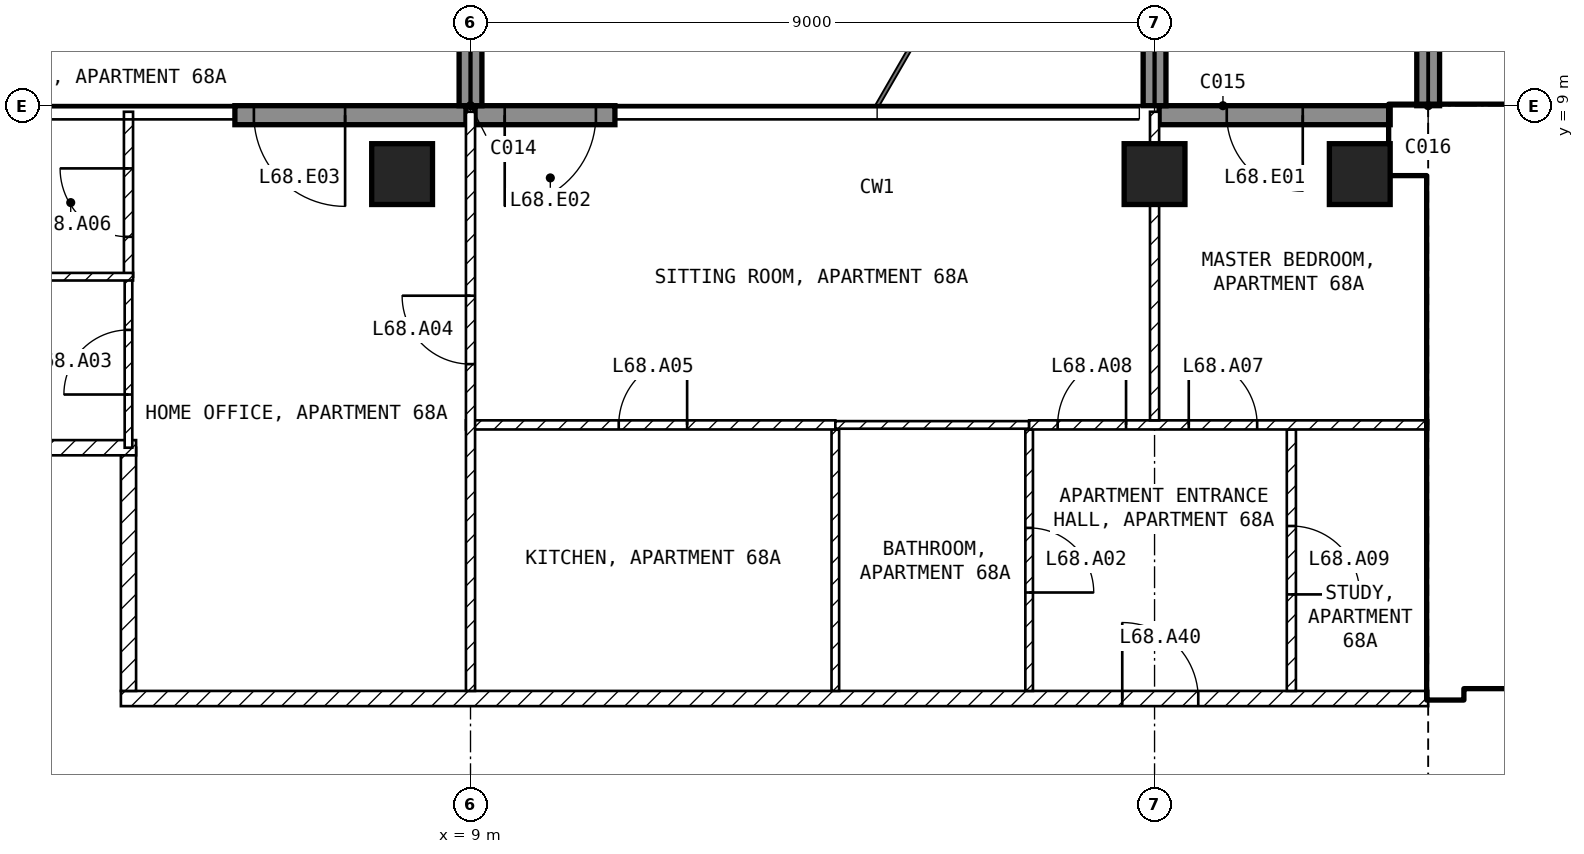
"""IFC4 building model, lengths in metres.
Left out: names, types, materials, properties, quantities, classifications, styles, units other than length and angle.
Written with IfcOpenShell. Run it as: python <this file> out.ifc"""

import sys

from ifc_helpers import new_model, si_unit, direction, frame, frame_2d, origin, origin_2d, place, context, subcontext, project, spatial, rectangle, extrude, element, fill, save


model = new_model("IFC4")
c1 = context("Model", 3, precision=1e-05, world=origin(), true_north=direction((0.0, 1.0)))
c2 = subcontext(c1, "Body", "Model", "MODEL_VIEW")
j1 = project(units=[si_unit("LENGTHUNIT", "METRE"), si_unit("PLANEANGLEUNIT", "RADIAN")], contexts=[c1])
p1 = place(None, origin())
s1 = spatial("IfcSite", under=j1, at=p1, CompositionType="ELEMENT")
p2 = place(p1, origin())
s2 = spatial("IfcBuilding", under=s1, at=p2, CompositionType="ELEMENT")
p3 = place(p2, frame((0.0, 0.0, 267.5)))
s3 = spatial("IfcBuildingStorey", under=s2, at=p3, CompositionType="ELEMENT", Elevation=267.5)
for number, where, z_axis, x_axis in (
    (1, (8.1, 8.1, -0.25), (0.0, 0.0, 1.0), (1.0, 0.0, 0.0)),
    (2, (18.0, 8.1, -0.25), (0.0, 0.0, 1.0), (1.0, 0.0, 0.0)),
    (3, (20.7, 8.1, -0.25), (0.0, 0.0, 1.0), (1.0, 0.0, 0.0)),
):
    element("IfcColumn", number, at=place(p3, frame(where, z_axis=z_axis, x_axis=x_axis)), inside=s3, PredefinedType="COLUMN", context=c2, shape_type="SweptSolid", body=[
        extrude(rectangle(XDim=0.8, YDim=0.8, at=origin_2d()), origin(), (0.0, 0.0, 1.0), 3.5),
    ])
p4 = place(p3, frame((21.1, 8.875, 0.0), z_axis=(0.0, 0.0, 1.0), x_axis=(-1.0, 0.0, 0.0)))
e4 = element("IfcWall", 4, at=p4, inside=s3, PredefinedType="SOLIDWALL", context=c2, shape_type="SweptSolid", body=[
    extrude(rectangle(XDim=3.04, YDim=0.25, at=frame_2d((1.52, 0.0))), origin(), (0.0, 0.0, 1.0), 3.25),
])
p5 = place(p4, frame((1.15, 0.0, 0.0)))
e5 = element("IfcOpeningElement", 5, at=p5, cuts=e4, PredefinedType="OPENING", context=c2, shape_type="SweptSolid", body=[
    extrude(rectangle(XDim=1.0, YDim=2.4, at=frame_2d((0.5, 1.2))), frame((0.0, 0.135, 0.0), z_axis=(0.0, -1.0, 0.0), x_axis=(1.0, 0.0, 0.0)), (0.0, 0.0, 1.0), 0.27),
])
p6 = place(p3, frame((10.9, 8.875, 0.0), z_axis=(0.0, 0.0, 1.0), x_axis=(-1.0, 0.0, 0.0)))
e6 = element("IfcWall", 6, at=p6, inside=s3, PredefinedType="SOLIDWALL", context=c2, shape_type="SweptSolid", body=[
    extrude(rectangle(XDim=1.84, YDim=0.25, at=frame_2d((0.92, 0.0))), origin(), (0.0, 0.0, 1.0), 3.25),
])
p7 = place(p6, frame((0.25, 0.0, 0.0)))
e7 = element("IfcOpeningElement", 7, at=p7, cuts=e6, PredefinedType="OPENING", context=c2, shape_type="SweptSolid", body=[
    extrude(rectangle(XDim=1.2, YDim=2.4, at=frame_2d((0.6, 1.2))), frame((0.0, 0.135, 0.0), z_axis=(0.0, -1.0, 0.0), x_axis=(1.0, 0.0, 0.0)), (0.0, 0.0, 1.0), 0.27),
])
p8 = place(p3, frame((8.94, 8.875, 0.0), z_axis=(0.0, 0.0, 1.0), x_axis=(-1.0, 0.0, 0.0)))
e8 = element("IfcWall", 8, at=p8, inside=s3, PredefinedType="SOLIDWALL", context=c2, shape_type="SweptSolid", body=[
    extrude(rectangle(XDim=3.04, YDim=0.25, at=frame_2d((1.52, 0.0))), origin(), (0.0, 0.0, 1.0), 3.25),
])
p9 = place(p8, frame((1.59, 0.0, 0.0)))
e9 = element("IfcOpeningElement", 9, at=p9, cuts=e8, PredefinedType="OPENING", context=c2, shape_type="SweptSolid", body=[
    extrude(rectangle(XDim=1.2, YDim=2.4, at=frame_2d((0.6, 1.2))), frame((0.0, 0.135, 0.0), z_axis=(0.0, -1.0, 0.0), x_axis=(1.0, 0.0, 0.0)), (0.0, 0.0, 1.0), 0.27),
])
for number, where, z_axis, x_axis in (
    (10, (9.0, 9.0, 0.0), (0.0, 0.0, 1.0), (0.0, 1.0, 0.0)),
    (11, (18.0, 9.0, 0.0), (0.0, 0.0, 1.0), (0.0, 1.0, 0.0)),
    (12, (21.6, 9.0, 0.0), (0.0, 0.0, 1.0), (0.0, 1.0, 0.0)),
):
    element("IfcWall", number, at=place(p3, frame(where, z_axis=z_axis, x_axis=x_axis)), inside=s3, PredefinedType="SOLIDWALL", context=c2, shape_type="SweptSolid", body=[
        extrude(rectangle(XDim=2.7, YDim=0.3, at=frame_2d((1.35, 0.0))), origin(), (0.0, 0.0, 1.0), 3.25),
    ])
p10 = place(p3, frame((21.1, 8.55, 0.0), z_axis=(0.0, 0.0, 1.0), x_axis=(1.0, 0.0, 0.0)))
e13 = element("IfcWall", 13, at=p10, inside=s3, PredefinedType="SHEAR", context=c2, shape_type="SweptSolid", body=[
    extrude(rectangle(XDim=8.65, YDim=0.9, at=frame_2d((4.325, 0.0))), origin(), (0.0, 0.0, 1.0), 3.25),
])
p11 = place(p3, frame((21.825, 1.2, 0.0), z_axis=(0.0, 0.0, 1.0), x_axis=(0.0, 1.0, 0.0)))
e14 = element("IfcWall", 14, at=p11, inside=s3, PredefinedType="SHEAR", context=c2, shape_type="SweptSolid", body=[
    extrude(rectangle(XDim=6.9, YDim=0.45, at=frame_2d((3.45, 0.0))), origin(), (0.0, 0.0, 1.0), 3.25),
])
p12 = place(p3, frame((22.05, 1.45, 0.0), z_axis=(0.0, 0.0, 1.0), x_axis=(1.0, 0.0, 0.0)))
e15 = element("IfcWall", 15, at=p12, inside=s3, PredefinedType="SOLIDWALL", context=c2, shape_type="SweptSolid", body=[
    extrude(rectangle(XDim=11.3, YDim=0.2, at=frame_2d((5.65, 0.0))), origin(), (0.0, 0.0, 1.0), 3.25),
])
p13 = place(p12, frame((0.75, 0.0, 0.0)))
e16 = element("IfcOpeningElement", 16, at=p13, cuts=e15, PredefinedType="OPENING", context=c2, shape_type="SweptSolid", body=[
    extrude(rectangle(XDim=1.0, YDim=2.1, at=frame_2d((0.5, 1.05))), frame((0.0, 0.11, 0.0), z_axis=(0.0, -1.0, 0.0), x_axis=(1.0, 0.0, 0.0)), (0.0, 0.0, 1.0), 0.22),
])
p14 = place(p12, frame((3.25, 0.0, 0.0)))
e17 = element("IfcOpeningElement", 17, at=p14, cuts=e15, PredefinedType="OPENING", context=c2, shape_type="SweptSolid", body=[
    extrude(rectangle(XDim=1.0, YDim=2.1, at=frame_2d((0.5, 1.05))), frame((0.0, 0.11, 0.0), z_axis=(0.0, -1.0, 0.0), x_axis=(1.0, 0.0, 0.0)), (0.0, 0.0, 1.0), 0.22),
])
p15 = place(p12, frame((9.225, 0.0, 0.0)))
e18 = element("IfcOpeningElement", 18, at=p15, cuts=e15, PredefinedType="OPENING", context=c2, shape_type="SweptSolid", body=[
    extrude(rectangle(XDim=0.9, YDim=2.1, at=frame_2d((0.45, 1.05))), frame((0.0, 0.11, 0.0), z_axis=(0.0, -1.0, 0.0), x_axis=(1.0, 0.0, 0.0)), (0.0, 0.0, 1.0), 0.22),
])
p16 = place(p3, frame((22.05, 5.15, 0.0), z_axis=(0.0, 0.0, 1.0), x_axis=(1.0, 0.0, 0.0)))
e19 = element("IfcWall", 19, at=p16, inside=s3, PredefinedType="SOLIDWALL", context=c2, shape_type="SweptSolid", body=[
    extrude(rectangle(XDim=6.3, YDim=0.2, at=frame_2d((3.15, 0.0))), origin(), (0.0, 0.0, 1.0), 3.25),
])
p17 = place(p16, frame((0.2, 0.0, 0.0)))
e20 = element("IfcOpeningElement", 20, at=p17, cuts=e19, PredefinedType="OPENING", context=c2, shape_type="SweptSolid", body=[
    extrude(rectangle(XDim=1.0, YDim=2.1, at=frame_2d((0.5, 1.05))), frame((0.0, 0.11, 0.0), z_axis=(0.0, -1.0, 0.0), x_axis=(1.0, 0.0, 0.0)), (0.0, 0.0, 1.0), 0.22),
])
p18 = place(p3, frame((4.4, 1.2, 0.0), z_axis=(0.0, 0.0, 1.0), x_axis=(1.0, 0.0, 0.0)))
e21 = element("IfcWall", 21, at=p18, inside=s3, PredefinedType="PARTITIONING", context=c2, shape_type="SweptSolid", body=[
    extrude(rectangle(XDim=17.2, YDim=0.2, at=frame_2d((8.6, 0.0))), origin(), (0.0, 0.0, 1.0), 3.25),
])
p19 = place(p18, frame((13.175, 0.0, 0.0)))
e22 = element("IfcOpeningElement", 22, at=p19, cuts=e21, PredefinedType="OPENING", context=c2, shape_type="SweptSolid", body=[
    extrude(rectangle(XDim=1.0, YDim=2.1, at=frame_2d((0.5, 1.05))), frame((0.0, 0.11, 0.0), z_axis=(0.0, -1.0, 0.0), x_axis=(1.0, 0.0, 0.0)), (0.0, 0.0, 1.0), 0.22),
])
p20 = place(p3, frame((4.5, 4.5, 0.0), z_axis=(0.0, 0.0, 1.0), x_axis=(0.0, -1.0, 0.0)))
e23 = element("IfcWall", 23, at=p20, inside=s3, PredefinedType="PARTITIONING", context=c2, shape_type="SweptSolid", body=[
    extrude(rectangle(XDim=3.2, YDim=0.2, at=frame_2d((1.6, 0.0))), origin(), (0.0, 0.0, 1.0), 3.25),
])
p21 = place(p3, frame((1.1, 4.5, 0.0), z_axis=(0.0, 0.0, 1.0), x_axis=(1.0, 0.0, 0.0)))
e24 = element("IfcWall", 24, at=p21, inside=s3, PredefinedType="PARTITIONING", context=c2, shape_type="SweptSolid", body=[
    extrude(rectangle(XDim=3.5, YDim=0.2, at=frame_2d((1.75, 0.0))), origin(), (0.0, 0.0, 1.0), 3.25),
])
p22 = place(p3, frame((13.8, 4.74, 0.0), z_axis=(0.0, 0.0, 1.0), x_axis=(0.0, -1.0, 0.0)))
e25 = element("IfcWall", 25, at=p22, inside=s3, PredefinedType="PARTITIONING", context=c2, shape_type="SweptSolid", body=[
    extrude(rectangle(XDim=3.44, YDim=0.1, at=frame_2d((1.72, 0.0))), origin(), (0.0, 0.0, 1.0), 3.25),
])
p23 = place(p3, frame((8.94, 4.8, 0.0), z_axis=(0.0, 0.0, 1.0), x_axis=(1.0, 0.0, 0.0)))
e26 = element("IfcWall", 26, at=p23, inside=s3, PredefinedType="PARTITIONING", context=c2, shape_type="SweptSolid", body=[
    extrude(rectangle(XDim=4.86, YDim=0.12, at=frame_2d((2.43, 0.0))), origin(), (0.0, 0.0, 1.0), 3.25),
])
p24 = place(p23, frame((2.01, 0.0, 0.0)))
e27 = element("IfcOpeningElement", 27, at=p24, cuts=e26, PredefinedType="OPENING", context=c2, shape_type="SweptSolid", body=[
    extrude(rectangle(XDim=0.9, YDim=2.1, at=frame_2d((0.45, 1.05))), frame((0.0, 0.07, 0.0), z_axis=(0.0, -1.0, 0.0), x_axis=(1.0, 0.0, 0.0)), (0.0, 0.0, 1.0), 0.14),
])
p25 = place(p3, frame((9.0, 1.3, 0.0), z_axis=(0.0, 0.0, 1.0), x_axis=(0.0, 1.0, 0.0)))
e28 = element("IfcWall", 28, at=p25, inside=s3, PredefinedType="PARTITIONING", context=c2, shape_type="SweptSolid", body=[
    extrude(rectangle(XDim=7.62, YDim=0.12, at=frame_2d((3.81, 0.0))), origin(), (0.0, 0.0, 1.0), 3.25),
])
p26 = place(p25, frame((4.3, 0.0, 0.0)))
e29 = element("IfcOpeningElement", 29, at=p26, cuts=e28, PredefinedType="OPENING", context=c2, shape_type="SweptSolid", body=[
    extrude(rectangle(XDim=0.9, YDim=2.1, at=frame_2d((0.45, 1.05))), frame((0.0, 0.07, 0.0), z_axis=(0.0, -1.0, 0.0), x_axis=(1.0, 0.0, 0.0)), (0.0, 0.0, 1.0), 0.14),
])
p27 = place(p3, frame((16.35, 4.74, 0.0), z_axis=(0.0, 0.0, 1.0), x_axis=(0.0, -1.0, 0.0)))
e30 = element("IfcWall", 30, at=p27, inside=s3, PredefinedType="PARTITIONING", context=c2, shape_type="SweptSolid", body=[
    extrude(rectangle(XDim=3.44, YDim=0.1, at=frame_2d((1.72, 0.0))), origin(), (0.0, 0.0, 1.0), 3.25),
])
p28 = place(p27, frame((1.295, 0.0, 0.0)))
e31 = element("IfcOpeningElement", 31, at=p28, cuts=e30, PredefinedType="OPENING", context=c2, shape_type="SweptSolid", body=[
    extrude(rectangle(XDim=0.85, YDim=2.1, at=frame_2d((0.425, 1.05))), frame((0.0, 0.06, 0.0), z_axis=(0.0, -1.0, 0.0), x_axis=(1.0, 0.0, 0.0)), (0.0, 0.0, 1.0), 0.12),
])
p29 = place(p3, frame((13.8, 4.8, 0.0), z_axis=(0.0, 0.0, 1.0), x_axis=(1.0, 0.0, 0.0)))
e32 = element("IfcWall", 32, at=p29, inside=s3, PredefinedType="PARTITIONING", context=c2, shape_type="SweptSolid", body=[
    extrude(rectangle(XDim=2.55, YDim=0.1, at=frame_2d((1.275, 0.0))), origin(), (0.0, 0.0, 1.0), 3.25),
])
p30 = place(p3, frame((19.8, 4.74, 0.0), z_axis=(0.0, 0.0, 1.0), x_axis=(0.0, -1.0, 0.0)))
e33 = element("IfcWall", 33, at=p30, inside=s3, PredefinedType="PARTITIONING", context=c2, shape_type="SweptSolid", body=[
    extrude(rectangle(XDim=3.44, YDim=0.12, at=frame_2d((1.72, 0.0))), origin(), (0.0, 0.0, 1.0), 3.25),
])
p31 = place(p30, frame((1.27, 0.0, 0.0)))
e34 = element("IfcOpeningElement", 34, at=p31, cuts=e33, PredefinedType="OPENING", context=c2, shape_type="SweptSolid", body=[
    extrude(rectangle(XDim=0.9, YDim=2.1, at=frame_2d((0.45, 1.05))), frame((0.0, 0.07, 0.0), z_axis=(0.0, -1.0, 0.0), x_axis=(1.0, 0.0, 0.0)), (0.0, 0.0, 1.0), 0.14),
])
p32 = place(p3, frame((16.35, 4.8, 0.0), z_axis=(0.0, 0.0, 1.0), x_axis=(1.0, 0.0, 0.0)))
e35 = element("IfcWall", 35, at=p32, inside=s3, PredefinedType="PARTITIONING", context=c2, shape_type="SweptSolid", body=[
    extrude(rectangle(XDim=5.25, YDim=0.12, at=frame_2d((2.625, 0.0))), origin(), (0.0, 0.0, 1.0), 3.25),
])
p33 = place(p32, frame((2.1, 0.0, 0.0)))
e36 = element("IfcOpeningElement", 36, at=p33, cuts=e35, PredefinedType="OPENING", context=c2, shape_type="SweptSolid", body=[
    extrude(rectangle(XDim=0.9, YDim=2.1, at=frame_2d((0.45, 1.05))), frame((0.0, 0.07, 0.0), z_axis=(0.0, -1.0, 0.0), x_axis=(1.0, 0.0, 0.0)), (0.0, 0.0, 1.0), 0.14),
])
p34 = place(p32, frame((0.375, 0.0, 0.0)))
e37 = element("IfcOpeningElement", 37, at=p34, cuts=e35, PredefinedType="OPENING", context=c2, shape_type="SweptSolid", body=[
    extrude(rectangle(XDim=0.9, YDim=2.1, at=frame_2d((0.45, 1.05))), frame((0.0, 0.07, 0.0), z_axis=(0.0, -1.0, 0.0), x_axis=(1.0, 0.0, 0.0)), (0.0, 0.0, 1.0), 0.14),
])
p35 = place(p3, frame((18.0, 8.92, 0.0), z_axis=(0.0, 0.0, 1.0), x_axis=(0.0, -1.0, 0.0)))
e38 = element("IfcWall", 38, at=p35, inside=s3, PredefinedType="PARTITIONING", context=c2, shape_type="SweptSolid", body=[
    extrude(rectangle(XDim=4.06, YDim=0.12, at=frame_2d((2.03, 0.0))), origin(), (0.0, 0.0, 1.0), 2.496),
])
p36 = place(p3, frame((4.5, 4.5, 0.0), z_axis=(0.0, 0.0, 1.0), x_axis=(0.0, 1.0, 0.0)))
e39 = element("IfcWall", 39, at=p36, inside=s3, PredefinedType="PARTITIONING", context=c2, shape_type="SweptSolid", body=[
    extrude(rectangle(XDim=2.25, YDim=0.1, at=frame_2d((1.125, 0.0))), origin(), (0.0, 0.0, 1.0), 3.25),
])
p37 = place(p36, frame((0.7, 0.0, 0.0)))
e40 = element("IfcOpeningElement", 40, at=p37, cuts=e39, PredefinedType="OPENING", context=c2, shape_type="SweptSolid", body=[
    extrude(rectangle(XDim=0.85, YDim=2.1, at=frame_2d((0.425, 1.05))), frame((0.0, 0.06, 0.0), z_axis=(0.0, -1.0, 0.0), x_axis=(1.0, 0.0, 0.0)), (0.0, 0.0, 1.0), 0.12),
])
p38 = place(p3, frame((4.5, 6.75, 0.0), z_axis=(0.0, 0.0, 1.0), x_axis=(0.0, 1.0, 0.0)))
e41 = element("IfcWall", 41, at=p38, inside=s3, PredefinedType="PARTITIONING", context=c2, shape_type="SweptSolid", body=[
    extrude(rectangle(XDim=2.17, YDim=0.12, at=frame_2d((1.085, 0.0))), origin(), (0.0, 0.0, 1.0), 3.25),
])
p39 = place(p38, frame((0.525, 0.0, 0.0)))
e42 = element("IfcOpeningElement", 42, at=p39, cuts=e41, PredefinedType="OPENING", context=c2, shape_type="SweptSolid", body=[
    extrude(rectangle(XDim=0.9, YDim=2.1, at=frame_2d((0.45, 1.05))), frame((0.0, 0.07, 0.0), z_axis=(0.0, -1.0, 0.0), x_axis=(1.0, 0.0, 0.0)), (0.0, 0.0, 1.0), 0.14),
])
p40 = place(p3, frame((1.1, 6.75, 0.0), z_axis=(0.0, 0.0, 1.0), x_axis=(1.0, 0.0, 0.0)))
e43 = element("IfcWall", 43, at=p40, inside=s3, PredefinedType="PARTITIONING", context=c2, shape_type="SweptSolid", body=[
    extrude(rectangle(XDim=3.46, YDim=0.1, at=frame_2d((1.73, 0.0))), origin(), (0.0, 0.0, 1.0), 3.25),
])
p41 = place(p5, origin())
e44 = element("IfcDoor", 44, at=p41, inside=s3, OperationType="SINGLE_SWING_LEFT", PredefinedType="DOOR", context=c2, shape_type="SweptSolid", body=[
    extrude(rectangle(XDim=1.0, YDim=2.4, at=frame_2d((0.5, 1.2))), frame((0.0, 0.025, 0.0), z_axis=(0.0, -1.0, 0.0), x_axis=(1.0, 0.0, 0.0)), (0.0, 0.0, 1.0), 0.05),
])
fill(e5, e44)
p42 = place(p7, origin())
e45 = element("IfcDoor", 45, at=p42, inside=s3, OperationType="SINGLE_SWING_RIGHT", PredefinedType="DOOR", context=c2, shape_type="SweptSolid", body=[
    extrude(rectangle(XDim=1.2, YDim=2.4, at=frame_2d((0.6, 1.2))), frame((0.0, 0.025, 0.0), z_axis=(0.0, -1.0, 0.0), x_axis=(1.0, 0.0, 0.0)), (0.0, 0.0, 1.0), 0.05),
])
fill(e7, e45)
p43 = place(p9, origin())
e46 = element("IfcDoor", 46, at=p43, inside=s3, OperationType="SINGLE_SWING_LEFT", PredefinedType="DOOR", context=c2, shape_type="SweptSolid", body=[
    extrude(rectangle(XDim=1.2, YDim=2.4, at=frame_2d((0.6, 1.2))), frame((0.0, 0.025, 0.0), z_axis=(0.0, -1.0, 0.0), x_axis=(1.0, 0.0, 0.0)), (0.0, 0.0, 1.0), 0.05),
])
fill(e9, e46)
p44 = place(p17, origin())
e47 = element("IfcDoor", 47, at=p44, inside=s3, OperationType="SINGLE_SWING_LEFT", PredefinedType="DOOR", context=c2, shape_type="SweptSolid", body=[
    extrude(rectangle(XDim=1.0, YDim=2.1, at=frame_2d((0.5, 1.05))), frame((0.0, 0.025, 0.0), z_axis=(0.0, -1.0, 0.0), x_axis=(1.0, 0.0, 0.0)), (0.0, 0.0, 1.0), 0.05),
])
fill(e20, e47)
p45 = place(p28, origin())
e48 = element("IfcDoor", 48, at=p45, inside=s3, OperationType="SINGLE_SWING_RIGHT", PredefinedType="DOOR", context=c2, shape_type="SweptSolid", body=[
    extrude(rectangle(XDim=0.85, YDim=2.1, at=frame_2d((0.425, 1.05))), frame((0.0, 0.025, 0.0), z_axis=(0.0, -1.0, 0.0), x_axis=(1.0, 0.0, 0.0)), (0.0, 0.0, 1.0), 0.05),
])
fill(e31, e48)
p46 = place(p37, origin())
e49 = element("IfcDoor", 49, at=p46, inside=s3, OperationType="SINGLE_SWING_LEFT", PredefinedType="DOOR", context=c2, shape_type="SweptSolid", body=[
    extrude(rectangle(XDim=0.85, YDim=2.1, at=frame_2d((0.425, 1.05))), frame((0.0, 0.025, 0.0), z_axis=(0.0, -1.0, 0.0), x_axis=(1.0, 0.0, 0.0)), (0.0, 0.0, 1.0), 0.05),
])
fill(e40, e49)
p47 = place(p26, origin())
e50 = element("IfcDoor", 50, at=p47, inside=s3, OperationType="SINGLE_SWING_RIGHT", PredefinedType="DOOR", context=c2, shape_type="SweptSolid", body=[
    extrude(rectangle(XDim=0.9, YDim=2.1, at=frame_2d((0.45, 1.05))), frame((0.0, 0.025, 0.0), z_axis=(0.0, -1.0, 0.0), x_axis=(1.0, 0.0, 0.0)), (0.0, 0.0, 1.0), 0.05),
])
fill(e29, e50)
p48 = place(p24, origin())
e51 = element("IfcDoor", 51, at=p48, inside=s3, OperationType="SINGLE_SWING_RIGHT", PredefinedType="DOOR", context=c2, shape_type="SweptSolid", body=[
    extrude(rectangle(XDim=0.9, YDim=2.1, at=frame_2d((0.45, 1.05))), frame((0.0, 0.025, 0.0), z_axis=(0.0, -1.0, 0.0), x_axis=(1.0, 0.0, 0.0)), (0.0, 0.0, 1.0), 0.05),
])
fill(e27, e51)
p49 = place(p39, origin())
e52 = element("IfcDoor", 52, at=p49, inside=s3, OperationType="SINGLE_SWING_RIGHT", PredefinedType="DOOR", context=c2, shape_type="SweptSolid", body=[
    extrude(rectangle(XDim=0.9, YDim=2.1, at=frame_2d((0.45, 1.05))), frame((0.0, 0.025, 0.0), z_axis=(0.0, -1.0, 0.0), x_axis=(1.0, 0.0, 0.0)), (0.0, 0.0, 1.0), 0.05),
])
fill(e42, e52)
p50 = place(p33, origin())
e53 = element("IfcDoor", 53, at=p50, inside=s3, OperationType="SINGLE_SWING_LEFT", PredefinedType="DOOR", context=c2, shape_type="SweptSolid", body=[
    extrude(rectangle(XDim=0.9, YDim=2.1, at=frame_2d((0.45, 1.05))), frame((0.0, 0.025, 0.0), z_axis=(0.0, -1.0, 0.0), x_axis=(1.0, 0.0, 0.0)), (0.0, 0.0, 1.0), 0.05),
])
fill(e36, e53)
p51 = place(p34, origin())
e54 = element("IfcDoor", 54, at=p51, inside=s3, OperationType="SINGLE_SWING_RIGHT", PredefinedType="DOOR", context=c2, shape_type="SweptSolid", body=[
    extrude(rectangle(XDim=0.9, YDim=2.1, at=frame_2d((0.45, 1.05))), frame((0.0, 0.025, 0.0), z_axis=(0.0, -1.0, 0.0), x_axis=(1.0, 0.0, 0.0)), (0.0, 0.0, 1.0), 0.05),
])
fill(e37, e54)
p52 = place(p31, origin())
e55 = element("IfcDoor", 55, at=p52, inside=s3, OperationType="SINGLE_SWING_RIGHT", PredefinedType="DOOR", context=c2, shape_type="SweptSolid", body=[
    extrude(rectangle(XDim=0.9, YDim=2.1, at=frame_2d((0.45, 1.05))), frame((0.0, 0.025, 0.0), z_axis=(0.0, -1.0, 0.0), x_axis=(1.0, 0.0, 0.0)), (0.0, 0.0, 1.0), 0.05),
])
fill(e34, e55)
p53 = place(p19, origin())
e56 = element("IfcDoor", 56, at=p53, inside=s3, OperationType="SINGLE_SWING_LEFT", PredefinedType="DOOR", context=c2, shape_type="SweptSolid", body=[
    extrude(rectangle(XDim=1.0, YDim=2.1, at=frame_2d((0.5, 1.05))), frame((0.0, 0.025, 0.0), z_axis=(0.0, -1.0, 0.0), x_axis=(1.0, 0.0, 0.0)), (0.0, 0.0, 1.0), 0.05),
])
fill(e22, e56)
save(model, sys.argv[1])
